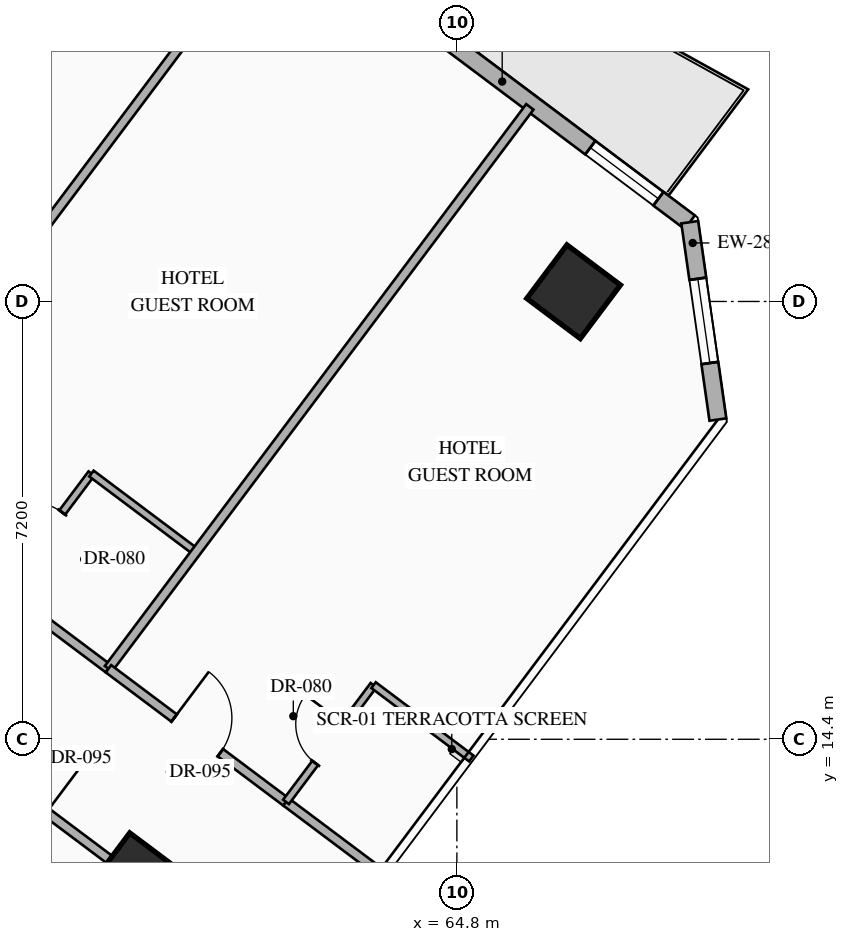
"""IFC4 building model, lengths in metres.
Left out: names, types, materials, properties, quantities, classifications, styles, units other than length and angle.
Written with IfcOpenShell. Run it as: python <this file> out.ifc"""

import sys

from ifc_helpers import new_model, si_unit, direction, frame, frame_2d, origin, origin_2d, place, context, subcontext, project, spatial, rectangle, hollow_rectangle, extrude, element, fill, save


model = new_model("IFC4")
c1 = context("Model", 3, precision=1e-05, world=origin(), true_north=direction((0.0, 1.0)))
c2 = subcontext(c1, "Body", "Model", "MODEL_VIEW")
j1 = project(units=[si_unit("LENGTHUNIT", "METRE"), si_unit("PLANEANGLEUNIT", "RADIAN")], contexts=[c1])
p1 = place(None, origin())
s1 = spatial("IfcSite", under=j1, at=p1, CompositionType="ELEMENT")
p2 = place(p1, origin())
s2 = spatial("IfcBuilding", under=s1, at=p2, CompositionType="ELEMENT")
p3 = place(p2, frame((0.0, 0.0, 60.05)))
s3 = spatial("IfcBuildingStorey", under=s2, at=p3, CompositionType="ELEMENT", Elevation=60.05)
p4 = place(p3, frame((66.72, 21.76, 0.0), z_axis=(0.0, 0.0, 1.0), x_axis=(0.799999996291, -0.600000004945, 0.0)))
e1 = element("IfcColumn", 1, at=p4, inside=s3, PredefinedType="COLUMN", context=c2, shape_type="SweptSolid", body=[
    extrude(hollow_rectangle(XDim=1.1, YDim=1.1, WallThickness=0.04, at=origin_2d()), origin(), (0.0, 0.0, 1.0), 3.35),
])
p5 = place(p3, frame((59.52, 12.16, 0.0), z_axis=(0.0, 0.0, 1.0), x_axis=(0.799999996291, -0.600000004945, 0.0)))
e2 = element("IfcColumn", 2, at=p5, inside=s3, PredefinedType="COLUMN", context=c2, shape_type="SweptSolid", body=[
    extrude(hollow_rectangle(XDim=1.0, YDim=1.0, WallThickness=0.038, at=origin_2d()), origin(), (0.0, 0.0, 1.0), 3.35),
])
p6 = place(p3, frame((44.86, 40.73, 0.0), z_axis=(0.0, 0.0, 1.0), x_axis=(0.800006902154, -0.599990797017, 0.0)))
e3 = element("IfcWall", 3, at=p6, inside=s3, PredefinedType="STANDARD", context=c2, shape_type="SweptSolid", body=[
    extrude(rectangle(XDim=29.712, YDim=0.28, at=frame_2d((14.856, 0.0))), origin(), (0.0, 0.0, 1.0), 3.13),
])
p7 = place(p6, frame((14.249, 0.0, 0.0)))
e4 = element("IfcOpeningElement", 4, at=p7, cuts=e3, PredefinedType="OPENING", context=c2, shape_type="SweptSolid", body=[
    extrude(rectangle(XDim=1.1, YDim=2.2, at=frame_2d((0.55, 1.1))), frame((0.0, 0.15, 0.0), z_axis=(0.0, -1.0, 0.0), x_axis=(1.0, 0.0, 0.0)), (0.0, 0.0, 1.0), 0.3),
])
p8 = place(p6, frame((1.612, 0.0, 0.85)))
e5 = element("IfcOpeningElement", 5, at=p8, cuts=e3, PredefinedType="OPENING", context=c2, shape_type="SweptSolid", body=[
    extrude(rectangle(XDim=1.4, YDim=1.8, at=frame_2d((0.7, 0.9))), frame((0.0, 0.15, 0.0), z_axis=(0.0, -1.0, 0.0), x_axis=(1.0, 0.0, 0.0)), (0.0, 0.0, 1.0), 0.3),
])
p9 = place(p6, frame((5.667, 0.0, 0.85)))
e6 = element("IfcOpeningElement", 6, at=p9, cuts=e3, PredefinedType="OPENING", context=c2, shape_type="SweptSolid", body=[
    extrude(rectangle(XDim=1.4, YDim=1.8, at=frame_2d((0.7, 0.9))), frame((0.0, 0.15, 0.0), z_axis=(0.0, -1.0, 0.0), x_axis=(1.0, 0.0, 0.0)), (0.0, 0.0, 1.0), 0.3),
])
p10 = place(p6, frame((9.912, 0.0, 0.85)))
e7 = element("IfcOpeningElement", 7, at=p10, cuts=e3, PredefinedType="OPENING", context=c2, shape_type="SweptSolid", body=[
    extrude(rectangle(XDim=1.4, YDim=1.8, at=frame_2d((0.7, 0.9))), frame((0.0, 0.15, 0.0), z_axis=(0.0, -1.0, 0.0), x_axis=(1.0, 0.0, 0.0)), (0.0, 0.0, 1.0), 0.3),
])
p11 = place(p6, frame((18.803, 0.0, 0.85)))
e8 = element("IfcOpeningElement", 8, at=p11, cuts=e3, PredefinedType="OPENING", context=c2, shape_type="SweptSolid", body=[
    extrude(rectangle(XDim=1.4, YDim=1.8, at=frame_2d((0.7, 0.9))), frame((0.0, 0.15, 0.0), z_axis=(0.0, -1.0, 0.0), x_axis=(1.0, 0.0, 0.0)), (0.0, 0.0, 1.0), 0.3),
])
p12 = place(p6, frame((22.645, 0.0, 0.85)))
e9 = element("IfcOpeningElement", 9, at=p12, cuts=e3, PredefinedType="OPENING", context=c2, shape_type="SweptSolid", body=[
    extrude(rectangle(XDim=1.4, YDim=1.8, at=frame_2d((0.7, 0.9))), frame((0.0, 0.15, 0.0), z_axis=(0.0, -1.0, 0.0), x_axis=(1.0, 0.0, 0.0)), (0.0, 0.0, 1.0), 0.3),
])
p13 = place(p6, frame((27.668, 0.0, 0.85)))
e10 = element("IfcOpeningElement", 10, at=p13, cuts=e3, PredefinedType="OPENING", context=c2, shape_type="SweptSolid", body=[
    extrude(rectangle(XDim=1.4, YDim=1.8, at=frame_2d((0.7, 0.9))), frame((0.0, 0.15, 0.0), z_axis=(0.0, -1.0, 0.0), x_axis=(1.0, 0.0, 0.0)), (0.0, 0.0, 1.0), 0.3),
])
p14 = place(p3, frame((68.63, 22.903, 0.0), z_axis=(0.0, 0.0, 1.0), x_axis=(0.141285803956, -0.989968848803, 0.0)))
e11 = element("IfcWall", 11, at=p14, inside=s3, PredefinedType="STANDARD", context=c2, shape_type="SweptSolid", body=[
    extrude(rectangle(XDim=3.278, YDim=0.28, at=frame_2d((1.639, 0.0))), origin(), (0.0, 0.0, 1.0), 3.13),
])
p15 = place(p14, frame((0.939, 0.0, 0.85)))
e12 = element("IfcOpeningElement", 12, at=p15, cuts=e11, PredefinedType="OPENING", context=c2, shape_type="SweptSolid", body=[
    extrude(rectangle(XDim=1.4, YDim=1.8, at=frame_2d((0.7, 0.9))), frame((0.0, 0.15, 0.0), z_axis=(0.0, -1.0, 0.0), x_axis=(1.0, 0.0, 0.0)), (0.0, 0.0, 1.0), 0.3),
])
for number, where, z_axis, x_axis in (
    (13, (51.39, 21.32, 0.0), (0.0, 0.0, 1.0), (0.6, 0.8, 0.0)),
    (14, (54.91, 18.68, 0.0), (0.0, 0.0, 1.0), (0.6, 0.8, 0.0)),
):
    element("IfcWall", number, at=place(p3, frame(where, z_axis=z_axis, x_axis=x_axis)), inside=s3, PredefinedType="PARTITIONING", context=c2, shape_type="SweptSolid", body=[
        extrude(rectangle(XDim=11.55, YDim=0.15, at=frame_2d((5.775, 0.0))), origin(), (0.0, 0.0, 1.0), 3.13),
    ])
p16 = place(p3, frame((57.35, 16.85, 0.0), z_axis=(0.0, 0.0, 1.0), x_axis=(0.79998637334, -0.60001816845, 0.0)))
e15 = element("IfcWall", 15, at=p16, inside=s3, PredefinedType="PARTITIONING", context=c2, shape_type="SweptSolid", body=[
    extrude(rectangle(XDim=2.15, YDim=0.15, at=frame_2d((1.075, 0.0))), origin(), (0.0, 0.0, 1.0), 2.775),
])
p17 = place(p3, frame((57.35, 16.85, 0.0), z_axis=(0.0, 0.0, 1.0), x_axis=(0.6, 0.8, 0.0)))
e16 = element("IfcWall", 16, at=p17, inside=s3, PredefinedType="PARTITIONING", context=c2, shape_type="SweptSolid", body=[
    extrude(rectangle(XDim=2.4, YDim=0.12, at=frame_2d((1.2, 0.0))), origin(), (0.0, 0.0, 1.0), 3.13),
])
p18 = place(p17, frame((0.8, 0.0, 0.0)))
e17 = element("IfcOpeningElement", 17, at=p18, cuts=e16, PredefinedType="OPENING", context=c2, shape_type="SweptSolid", body=[
    extrude(rectangle(XDim=0.8, YDim=2.06, at=frame_2d((0.4, 1.03))), frame((0.0, 0.07, 0.0), z_axis=(0.0, -1.0, 0.0), x_axis=(1.0, 0.0, 0.0)), (0.0, 0.0, 1.0), 0.14),
])
p19 = place(p3, frame((58.79, 18.77, 0.0), z_axis=(0.0, 0.0, 1.0), x_axis=(0.79998637334, -0.60001816845, 0.0)))
e18 = element("IfcWall", 18, at=p19, inside=s3, PredefinedType="PARTITIONING", context=c2, shape_type="SweptSolid", body=[
    extrude(rectangle(XDim=2.15, YDim=0.12, at=frame_2d((1.075, 0.0))), origin(), (0.0, 0.0, 1.0), 3.13),
])
p20 = place(p3, frame((59.07, 15.56, 0.0), z_axis=(0.0, 0.0, 1.0), x_axis=(0.599996617946, 0.80000253653, 0.0)))
e19 = element("IfcWall", 19, at=p20, inside=s3, PredefinedType="PARTITIONING", context=c2, shape_type="SweptSolid", body=[
    extrude(rectangle(XDim=11.55, YDim=0.15, at=frame_2d((5.775, 0.0))), origin(), (0.0, 0.0, 1.0), 3.13),
])
p21 = place(p3, frame((59.07, 15.56, 0.0), z_axis=(0.0, 0.0, 1.0), x_axis=(0.8, -0.6, 0.0)))
e20 = element("IfcWall", 20, at=p21, inside=s3, PredefinedType="PARTITIONING", context=c2, shape_type="SweptSolid", body=[
    extrude(rectangle(XDim=3.65, YDim=0.15, at=frame_2d((1.825, 0.0))), origin(), (0.0, 0.0, 1.0), 2.775),
])
p22 = place(p21, frame((1.35, 0.0, 0.0)))
e21 = element("IfcOpeningElement", 21, at=p22, cuts=e20, PredefinedType="OPENING", context=c2, shape_type="SweptSolid", body=[
    extrude(rectangle(XDim=0.95, YDim=2.15, at=frame_2d((0.475, 1.075))), frame((0.0, 0.085, 0.0), z_axis=(0.0, -1.0, 0.0), x_axis=(1.0, 0.0, 0.0)), (0.0, 0.0, 1.0), 0.17),
])
p23 = place(p3, frame((61.99, 13.37, 0.0), z_axis=(0.0, 0.0, 1.0), x_axis=(0.79997084737, -0.600038868206, 0.0)))
e22 = element("IfcWall", 22, at=p23, inside=s3, PredefinedType="PARTITIONING", context=c2, shape_type="SweptSolid", body=[
    extrude(rectangle(XDim=2.01, YDim=0.15, at=frame_2d((1.005, 0.0))), origin(), (0.0, 0.0, 1.0), 3.13),
])
p24 = place(p3, frame((61.99, 13.37, 0.0), z_axis=(0.0, 0.0, 1.0), x_axis=(0.6, 0.8, 0.0)))
e23 = element("IfcWall", 23, at=p24, inside=s3, PredefinedType="PARTITIONING", context=c2, shape_type="SweptSolid", body=[
    extrude(rectangle(XDim=2.4, YDim=0.12, at=frame_2d((1.2, 0.0))), origin(), (0.0, 0.0, 1.0), 3.13),
])
p25 = place(p24, frame((0.8, 0.0, 0.0)))
e24 = element("IfcOpeningElement", 24, at=p25, cuts=e23, PredefinedType="OPENING", context=c2, shape_type="SweptSolid", body=[
    extrude(rectangle(XDim=0.8, YDim=2.06, at=frame_2d((0.4, 1.03))), frame((0.0, 0.07, 0.0), z_axis=(0.0, -1.0, 0.0), x_axis=(1.0, 0.0, 0.0)), (0.0, 0.0, 1.0), 0.14),
])
p26 = place(p3, frame((63.43, 15.29, 0.0), z_axis=(0.0, 0.0, 1.0), x_axis=(0.800014574191, -0.599980567254, 0.0)))
e25 = element("IfcWall", 25, at=p26, inside=s3, PredefinedType="PARTITIONING", context=c2, shape_type="SweptSolid", body=[
    extrude(rectangle(XDim=2.01, YDim=0.12, at=frame_2d((1.005, 0.0))), origin(), (0.0, 0.0, 1.0), 3.13),
])
p27 = place(p3, frame((56.61, 14.28, 0.0), z_axis=(0.0, 0.0, 1.0), x_axis=(0.8, -0.6, 0.0)))
e26 = element("IfcWall", 26, at=p27, inside=s3, PredefinedType="PARTITIONING", context=c2, shape_type="SweptSolid", body=[
    extrude(rectangle(XDim=4.85, YDim=0.15, at=frame_2d((2.425, 0.0))), origin(), (0.0, 0.0, 1.0), 2.425),
])
p28 = place(p27, frame((0.851, 0.0, 0.0)))
e27 = element("IfcOpeningElement", 27, at=p28, cuts=e26, PredefinedType="OPENING", context=c2, shape_type="SweptSolid", body=[
    extrude(rectangle(XDim=0.95, YDim=2.15, at=frame_2d((0.475, 1.075))), frame((0.0, 0.085, 0.0), z_axis=(0.0, -1.0, 0.0), x_axis=(1.0, 0.0, 0.0)), (0.0, 0.0, 1.0), 0.17),
])
p29 = place(p13, origin())
e28 = element("IfcWindow", 28, at=p29, inside=s3, PartitioningType="SINGLE_PANEL", PredefinedType="WINDOW", context=c2, shape_type="SweptSolid", body=[
    extrude(rectangle(XDim=1.4, YDim=1.8, at=frame_2d((0.7, 0.9))), frame((0.0, 0.03, 0.0), z_axis=(0.0, -1.0, 0.0), x_axis=(1.0, 0.0, 0.0)), (0.0, 0.0, 1.0), 0.06),
])
fill(e10, e28)
p30 = place(p15, origin())
e29 = element("IfcWindow", 29, at=p30, inside=s3, PartitioningType="SINGLE_PANEL", PredefinedType="WINDOW", context=c2, shape_type="SweptSolid", body=[
    extrude(rectangle(XDim=1.4, YDim=1.8, at=frame_2d((0.7, 0.9))), frame((0.0, 0.03, 0.0), z_axis=(0.0, -1.0, 0.0), x_axis=(1.0, 0.0, 0.0)), (0.0, 0.0, 1.0), 0.06),
])
fill(e12, e29)
p31 = place(p18, origin())
e30 = element("IfcDoor", 30, at=p31, inside=s3, OperationType="SINGLE_SWING_LEFT", PredefinedType="DOOR", context=c2, shape_type="SweptSolid", body=[
    extrude(rectangle(XDim=0.8, YDim=2.06, at=frame_2d((0.4, 1.03))), frame((0.0, 0.025, 0.0), z_axis=(0.0, -1.0, 0.0), x_axis=(1.0, 0.0, 0.0)), (0.0, 0.0, 1.0), 0.05),
])
fill(e17, e30)
p32 = place(p22, origin())
e31 = element("IfcDoor", 31, at=p32, inside=s3, OperationType="SINGLE_SWING_LEFT", PredefinedType="DOOR", context=c2, shape_type="SweptSolid", body=[
    extrude(rectangle(XDim=0.95, YDim=2.15, at=frame_2d((0.475, 1.075))), frame((0.0, 0.025, 0.0), z_axis=(0.0, -1.0, 0.0), x_axis=(1.0, 0.0, 0.0)), (0.0, 0.0, 1.0), 0.05),
])
fill(e21, e31)
p33 = place(p25, origin())
e32 = element("IfcDoor", 32, at=p33, inside=s3, OperationType="SINGLE_SWING_RIGHT", PredefinedType="DOOR", context=c2, shape_type="SweptSolid", body=[
    extrude(rectangle(XDim=0.8, YDim=2.06, at=frame_2d((0.4, 1.03))), frame((0.0, 0.025, 0.0), z_axis=(0.0, -1.0, 0.0), x_axis=(1.0, 0.0, 0.0)), (0.0, 0.0, 1.0), 0.05),
])
fill(e24, e32)
save(model, sys.argv[1])
